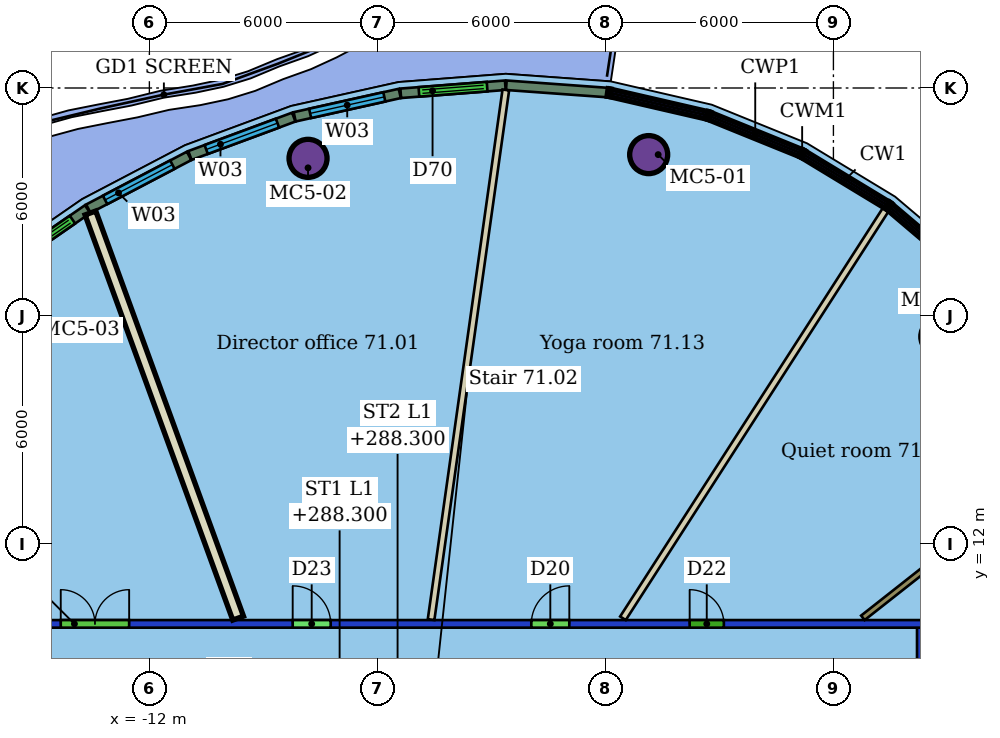
"""IFC4 building model, lengths in metres.
Left out: names, types, materials, properties, quantities, classifications, styles, units other than length and angle.
Written with IfcOpenShell. Run it as: python <this file> out.ifc"""

import sys

from ifc_helpers import new_model, si_unit, direction, frame, frame_2d, origin, origin_2d, place, context, subcontext, project, spatial, rectangle, hollow_circle, extrude, element, fill, save


model = new_model("IFC4")
c1 = context("Model", 3, precision=1e-05, world=origin(), true_north=direction((0.0, 1.0)))
c2 = subcontext(c1, "Body", "Model", "MODEL_VIEW")
j1 = project(units=[si_unit("LENGTHUNIT", "METRE"), si_unit("PLANEANGLEUNIT", "RADIAN")], contexts=[c1])
p1 = place(None, origin())
s1 = spatial("IfcSite", under=j1, at=p1, CompositionType="ELEMENT")
p2 = place(p1, origin())
s2 = spatial("IfcBuilding", under=s1, at=p2, CompositionType="ELEMENT")
p3 = place(p2, frame((0.0, 0.0, 286.5)))
s3 = spatial("IfcBuildingStorey", under=s2, at=p3, CompositionType="ELEMENT", Elevation=286.5)
for number, where, z_axis, x_axis in (
    (1, (1.138, 22.247, 0.0), (0.0, 0.0, 1.0), (1.0, 0.0, 0.0)),
    (2, (-7.825, 22.149, 0.0), (0.0, 0.0, 1.0), (1.0, 0.0, 0.0)),
):
    element("IfcColumn", number, at=place(p3, frame(where, z_axis=z_axis, x_axis=x_axis)), inside=s3, PredefinedType="COLUMN", context=c2, shape_type="SweptSolid", body=[
        extrude(hollow_circle(Radius=0.5, WallThickness=0.04, at=origin_2d()), origin(), (0.0, 0.0, 1.0), 3.45),
    ])
p4 = place(p3, frame((-20.4, 9.9, 0.0), z_axis=(0.0, 0.0, 1.0), x_axis=(1.0, 0.0, 0.0)))
e3 = element("IfcWall", 3, at=p4, inside=s3, PredefinedType="PARTITIONING", context=c2, shape_type="SweptSolid", body=[
    extrude(rectangle(XDim=28.8, YDim=0.2, at=frame_2d((14.4, 0.0))), origin(), (0.0, 0.0, 1.0), 3.1),
])
p5 = place(p4, frame((12.171, 0.0, 0.0)))
e4 = element("IfcOpeningElement", 4, at=p5, cuts=e3, PredefinedType="OPENING", context=c2, shape_type="SweptSolid", body=[
    extrude(rectangle(XDim=1.0, YDim=2.4, at=frame_2d((0.5, 1.2))), frame((0.0, 0.11, 0.0), z_axis=(0.0, -1.0, 0.0), x_axis=(1.0, 0.0, 0.0)), (0.0, 0.0, 1.0), 0.22),
])
p6 = place(p4, frame((6.068, 0.0, 0.0)))
e5 = element("IfcOpeningElement", 5, at=p6, cuts=e3, PredefinedType="OPENING", context=c2, shape_type="SweptSolid", body=[
    extrude(rectangle(XDim=1.8, YDim=2.4, at=frame_2d((0.9, 1.2))), frame((0.0, 0.11, 0.0), z_axis=(0.0, -1.0, 0.0), x_axis=(1.0, 0.0, 0.0)), (0.0, 0.0, 1.0), 0.22),
])
p7 = place(p4, frame((22.617, 0.0, 0.0)))
e6 = element("IfcOpeningElement", 6, at=p7, cuts=e3, PredefinedType="OPENING", context=c2, shape_type="SweptSolid", body=[
    extrude(rectangle(XDim=0.9, YDim=2.1, at=frame_2d((0.45, 1.05))), frame((0.0, 0.11, 0.0), z_axis=(0.0, -1.0, 0.0), x_axis=(1.0, 0.0, 0.0)), (0.0, 0.0, 1.0), 0.22),
])
p8 = place(p4, frame((18.45, 0.0, 0.0)))
e7 = element("IfcOpeningElement", 7, at=p8, cuts=e3, PredefinedType="OPENING", context=c2, shape_type="SweptSolid", body=[
    extrude(rectangle(XDim=1.0, YDim=2.1, at=frame_2d((0.5, 1.05))), frame((0.0, 0.11, 0.0), z_axis=(0.0, -1.0, 0.0), x_axis=(1.0, 0.0, 0.0)), (0.0, 0.0, 1.0), 0.22),
])
p9 = place(p3, frame((8.3, 9.8, 0.0), z_axis=(0.0, 0.0, 1.0), x_axis=(0.0, -1.0, 0.0)))
e8 = element("IfcWall", 8, at=p9, inside=s3, PredefinedType="PARTITIONING", context=c2, shape_type="SweptSolid", body=[
    extrude(rectangle(XDim=19.6, YDim=0.2, at=frame_2d((9.8, 0.0))), origin(), (0.0, 0.0, 1.0), 3.1),
])
p10 = place(p9, frame((14.011, 0.0, 0.0)))
e9 = element("IfcOpeningElement", 9, at=p10, cuts=e8, PredefinedType="OPENING", context=c2, shape_type="SweptSolid", body=[
    extrude(rectangle(XDim=1.5, YDim=2.1, at=frame_2d((0.75, 1.05))), frame((0.0, 0.11, 0.0), z_axis=(0.0, -1.0, 0.0), x_axis=(1.0, 0.0, 0.0)), (0.0, 0.0, 1.0), 0.22),
])
p11 = place(p9, frame((8.798, 0.0, 0.0)))
e10 = element("IfcOpeningElement", 10, at=p11, cuts=e8, PredefinedType="OPENING", context=c2, shape_type="SweptSolid", body=[
    extrude(rectangle(XDim=0.9, YDim=2.1, at=frame_2d((0.45, 1.05))), frame((0.0, 0.11, 0.0), z_axis=(0.0, -1.0, 0.0), x_axis=(1.0, 0.0, 0.0)), (0.0, 0.0, 1.0), 0.22),
])
p12 = place(p9, frame((5.084, 0.0, 0.0)))
e11 = element("IfcOpeningElement", 11, at=p12, cuts=e8, PredefinedType="OPENING", context=c2, shape_type="SweptSolid", body=[
    extrude(rectangle(XDim=1.5, YDim=2.4, at=frame_2d((0.75, 1.2))), frame((0.0, 0.11, 0.0), z_axis=(0.0, -1.0, 0.0), x_axis=(1.0, 0.0, 0.0)), (0.0, 0.0, 1.0), 0.22),
])
p13 = place(p9, frame((1.387, 0.0, 0.0)))
e12 = element("IfcOpeningElement", 12, at=p13, cuts=e8, PredefinedType="OPENING", context=c2, shape_type="SweptSolid", body=[
    extrude(rectangle(XDim=1.0, YDim=2.1, at=frame_2d((0.5, 1.05))), frame((0.0, 0.11, 0.0), z_axis=(0.0, -1.0, 0.0), x_axis=(1.0, 0.0, 0.0)), (0.0, 0.0, 1.0), 0.22),
])
p14 = place(p3, frame((-2.62, 23.948, 0.0), z_axis=(0.0, 0.0, 1.0), x_axis=(-0.139726049036, -0.990190199518, 0.0)))
e13 = element("IfcWall", 13, at=p14, inside=s3, PredefinedType="PARTITIONING", context=c2, shape_type="SweptSolid", body=[
    extrude(rectangle(XDim=14.074, YDim=0.175, at=frame_2d((7.037, 0.0))), origin(), (0.0, 0.0, 1.0), 3.45),
])
p15 = place(p3, frame((-13.551, 20.712, 0.0), z_axis=(0.0, 0.0, 1.0), x_axis=(0.342537626191, -0.939504111031, 0.0)))
e14 = element("IfcWall", 14, at=p15, inside=s3, PredefinedType="PARTITIONING", context=c2, shape_type="SweptSolid", body=[
    extrude(rectangle(XDim=11.347, YDim=0.3, at=frame_2d((5.673, 0.0))), origin(), (0.0, 0.0, 1.0), 3.45),
])
p16 = place(p3, frame((12.656, 14.689, 0.0), z_axis=(0.0, 0.0, 1.0), x_axis=(-0.78567951845, -0.618633731936, 0.0)))
e15 = element("IfcWall", 15, at=p16, inside=s3, PredefinedType="PARTITIONING", context=c2, shape_type="SweptSolid", body=[
    extrude(rectangle(XDim=7.484, YDim=0.15, at=frame_2d((3.742, 0.0))), origin(), (0.0, 0.0, 1.0), 3.45),
])
p17 = place(p3, frame((7.375, 20.796, 0.0), z_axis=(0.0, 0.0, 1.0), x_axis=(-0.540918824155, -0.841074803852, 0.0)))
e16 = element("IfcWall", 16, at=p17, inside=s3, PredefinedType="PARTITIONING", context=c2, shape_type="SweptSolid", body=[
    extrude(rectangle(XDim=12.78, YDim=0.175, at=frame_2d((6.39, 0.0))), origin(), (0.0, 0.0, 1.0), 3.45),
])
p18 = place(p3, frame((0.043, 23.881, 0.0), z_axis=(0.0, 0.0, 1.0), x_axis=(-0.997395344453, 0.072128544025, 0.0)))
e17 = element("IfcWall", 17, at=p18, inside=s3, PredefinedType="SOLIDWALL", context=c2, shape_type="SweptSolid", body=[
    extrude(rectangle(XDim=2.657, YDim=0.25, at=frame_2d((1.329, 0.0))), origin(), (0.0, 0.0, 1.0), 3.15),
])
p19 = place(p3, frame((-2.634, 24.073, 0.0), z_axis=(0.0, 0.0, 1.0), x_axis=(-0.997054485502, -0.076696498885, 0.0)))
e18 = element("IfcWall", 18, at=p19, inside=s3, PredefinedType="SOLIDWALL", context=c2, shape_type="SweptSolid", body=[
    extrude(rectangle(XDim=2.76, YDim=0.25, at=frame_2d((1.38, 0.0))), origin(), (0.0, 0.0, 1.0), 3.15),
])
p20 = place(p19, frame((0.48, 0.0, 0.0)))
e19 = element("IfcOpeningElement", 19, at=p20, cuts=e18, PredefinedType="OPENING", context=c2, shape_type="SweptSolid", body=[
    extrude(rectangle(XDim=1.8, YDim=2.4, at=frame_2d((0.9, 1.2))), frame((0.0, 0.135, 0.0), z_axis=(0.0, -1.0, 0.0), x_axis=(1.0, 0.0, 0.0)), (0.0, 0.0, 1.0), 0.27),
])
p21 = place(p3, frame((-5.411, 23.857, 0.0), z_axis=(0.0, 0.0, 1.0), x_axis=(-0.976083550613, -0.217395727242, 0.0)))
e20 = element("IfcWall", 20, at=p21, inside=s3, PredefinedType="SOLIDWALL", context=c2, shape_type="SweptSolid", body=[
    extrude(rectangle(XDim=2.833, YDim=0.25, at=frame_2d((1.417, 0.0))), origin(), (0.0, 0.0, 1.0), 3.15),
])
p22 = place(p21, frame((0.417, 0.0, 0.9)))
e21 = element("IfcOpeningElement", 21, at=p22, cuts=e20, PredefinedType="OPENING", context=c2, shape_type="SweptSolid", body=[
    extrude(rectangle(XDim=2.0, YDim=2.1, at=frame_2d((1.0, 1.05))), frame((0.0, 0.135, 0.0), z_axis=(0.0, -1.0, 0.0), x_axis=(1.0, 0.0, 0.0)), (0.0, 0.0, 1.0), 0.27),
])
p23 = place(p3, frame((-8.201, 23.234, 0.0), z_axis=(0.0, 0.0, 1.0), x_axis=(-0.937870025434, -0.346986765442, 0.0)))
e22 = element("IfcWall", 22, at=p23, inside=s3, PredefinedType="SOLIDWALL", context=c2, shape_type="SweptSolid", body=[
    extrude(rectangle(XDim=2.913, YDim=0.25, at=frame_2d((1.457, 0.0))), origin(), (0.0, 0.0, 1.0), 3.15),
])
p24 = place(p23, frame((0.457, 0.0, 0.9)))
e23 = element("IfcOpeningElement", 23, at=p24, cuts=e22, PredefinedType="OPENING", context=c2, shape_type="SweptSolid", body=[
    extrude(rectangle(XDim=2.0, YDim=2.1, at=frame_2d((1.0, 1.05))), frame((0.0, 0.135, 0.0), z_axis=(0.0, -1.0, 0.0), x_axis=(1.0, 0.0, 0.0)), (0.0, 0.0, 1.0), 0.27),
])
p25 = place(p3, frame((-10.955, 22.214, 0.0), z_axis=(0.0, 0.0, 1.0), x_axis=(-0.885698994615, -0.464259938977, 0.0)))
e24 = element("IfcWall", 24, at=p25, inside=s3, PredefinedType="SOLIDWALL", context=c2, shape_type="SweptSolid", body=[
    extrude(rectangle(XDim=2.993, YDim=0.25, at=frame_2d((1.497, 0.0))), origin(), (0.0, 0.0, 1.0), 3.15),
])
p26 = place(p25, frame((0.497, 0.0, 0.9)))
e25 = element("IfcOpeningElement", 25, at=p26, cuts=e24, PredefinedType="OPENING", context=c2, shape_type="SweptSolid", body=[
    extrude(rectangle(XDim=2.0, YDim=2.1, at=frame_2d((1.0, 1.05))), frame((0.0, 0.135, 0.0), z_axis=(0.0, -1.0, 0.0), x_axis=(1.0, 0.0, 0.0)), (0.0, 0.0, 1.0), 0.27),
])
p27 = place(p3, frame((-13.625, 20.812, 0.0), z_axis=(0.0, 0.0, 1.0), x_axis=(-0.822592980817, -0.568630625196, 0.0)))
e26 = element("IfcWall", 26, at=p27, inside=s3, PredefinedType="SOLIDWALL", context=c2, shape_type="SweptSolid", body=[
    extrude(rectangle(XDim=3.069, YDim=0.25, at=frame_2d((1.534, 0.0))), origin(), (0.0, 0.0, 1.0), 3.15),
])
p28 = place(p27, frame((0.484, 0.0, 0.0)))
e27 = element("IfcOpeningElement", 27, at=p28, cuts=e26, PredefinedType="OPENING", context=c2, shape_type="SweptSolid", body=[
    extrude(rectangle(XDim=1.8, YDim=2.4, at=frame_2d((0.9, 1.2))), frame((0.0, 0.135, 0.0), z_axis=(0.0, -1.0, 0.0), x_axis=(1.0, 0.0, 0.0)), (0.0, 0.0, 1.0), 0.27),
])
p29 = place(p5, origin())
e28 = element("IfcDoor", 28, at=p29, inside=s3, OperationType="SINGLE_SWING_LEFT", PredefinedType="DOOR", context=c2, shape_type="SweptSolid", body=[
    extrude(rectangle(XDim=1.0, YDim=2.4, at=frame_2d((0.5, 1.2))), frame((0.0, 0.025, 0.0), z_axis=(0.0, -1.0, 0.0), x_axis=(1.0, 0.0, 0.0)), (0.0, 0.0, 1.0), 0.05),
])
fill(e4, e28)
p30 = place(p6, origin())
e29 = element("IfcDoor", 29, at=p30, inside=s3, OperationType="DOUBLE_DOOR_SINGLE_SWING", PredefinedType="DOOR", context=c2, shape_type="SweptSolid", body=[
    extrude(rectangle(XDim=1.8, YDim=2.4, at=frame_2d((0.9, 1.2))), frame((0.0, 0.025, 0.0), z_axis=(0.0, -1.0, 0.0), x_axis=(1.0, 0.0, 0.0)), (0.0, 0.0, 1.0), 0.05),
])
fill(e5, e29)
p31 = place(p7, origin())
e30 = element("IfcDoor", 30, at=p31, inside=s3, OperationType="SINGLE_SWING_LEFT", PredefinedType="DOOR", context=c2, shape_type="SweptSolid", body=[
    extrude(rectangle(XDim=0.9, YDim=2.1, at=frame_2d((0.45, 1.05))), frame((0.0, 0.025, 0.0), z_axis=(0.0, -1.0, 0.0), x_axis=(1.0, 0.0, 0.0)), (0.0, 0.0, 1.0), 0.05),
])
fill(e6, e30)
p32 = place(p8, origin())
e31 = element("IfcDoor", 31, at=p32, inside=s3, OperationType="SINGLE_SWING_RIGHT", PredefinedType="DOOR", context=c2, shape_type="SweptSolid", body=[
    extrude(rectangle(XDim=1.0, YDim=2.1, at=frame_2d((0.5, 1.05))), frame((0.0, 0.025, 0.0), z_axis=(0.0, -1.0, 0.0), x_axis=(1.0, 0.0, 0.0)), (0.0, 0.0, 1.0), 0.05),
])
fill(e7, e31)
p33 = place(p20, origin())
e32 = element("IfcDoor", 32, at=p33, inside=s3, OperationType="DOUBLE_DOOR_SLIDING", PredefinedType="DOOR", context=c2, shape_type="SweptSolid", body=[
    extrude(rectangle(XDim=1.8, YDim=2.4, at=frame_2d((0.9, 1.2))), frame((0.0, 0.025, 0.0), z_axis=(0.0, -1.0, 0.0), x_axis=(1.0, 0.0, 0.0)), (0.0, 0.0, 1.0), 0.05),
])
fill(e19, e32)
p34 = place(p22, origin())
e33 = element("IfcWindow", 33, at=p34, inside=s3, PartitioningType="SINGLE_PANEL", PredefinedType="WINDOW", context=c2, shape_type="SweptSolid", body=[
    extrude(rectangle(XDim=2.0, YDim=2.1, at=frame_2d((1.0, 1.05))), frame((0.0, 0.03, 0.0), z_axis=(0.0, -1.0, 0.0), x_axis=(1.0, 0.0, 0.0)), (0.0, 0.0, 1.0), 0.06),
])
fill(e21, e33)
p35 = place(p24, origin())
e34 = element("IfcWindow", 34, at=p35, inside=s3, PartitioningType="SINGLE_PANEL", PredefinedType="WINDOW", context=c2, shape_type="SweptSolid", body=[
    extrude(rectangle(XDim=2.0, YDim=2.1, at=frame_2d((1.0, 1.05))), frame((0.0, 0.03, 0.0), z_axis=(0.0, -1.0, 0.0), x_axis=(1.0, 0.0, 0.0)), (0.0, 0.0, 1.0), 0.06),
])
fill(e23, e34)
p36 = place(p26, origin())
e35 = element("IfcWindow", 35, at=p36, inside=s3, PartitioningType="SINGLE_PANEL", PredefinedType="WINDOW", context=c2, shape_type="SweptSolid", body=[
    extrude(rectangle(XDim=2.0, YDim=2.1, at=frame_2d((1.0, 1.05))), frame((0.0, 0.03, 0.0), z_axis=(0.0, -1.0, 0.0), x_axis=(1.0, 0.0, 0.0)), (0.0, 0.0, 1.0), 0.06),
])
fill(e25, e35)
p37 = place(p28, origin())
e36 = element("IfcDoor", 36, at=p37, inside=s3, OperationType="DOUBLE_DOOR_SLIDING", PredefinedType="DOOR", context=c2, shape_type="SweptSolid", body=[
    extrude(rectangle(XDim=1.8, YDim=2.4, at=frame_2d((0.9, 1.2))), frame((0.0, 0.025, 0.0), z_axis=(0.0, -1.0, 0.0), x_axis=(1.0, 0.0, 0.0)), (0.0, 0.0, 1.0), 0.05),
])
fill(e27, e36)
save(model, sys.argv[1])
